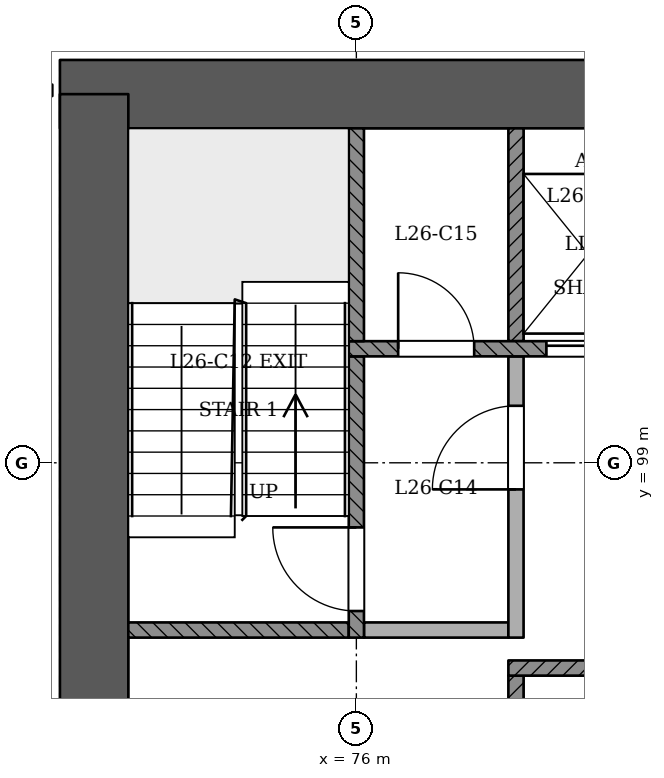
"""IFC4 building model, lengths in metres.
Left out: names, types, materials, properties, quantities, classifications, styles, units other than length and angle.
Written with IfcOpenShell. Run it as: python <this file> out.ifc"""

import sys

from ifc_helpers import new_model, si_unit, direction, frame, frame_2d, origin, place, context, subcontext, project, spatial, rectangle, extrude, element, fill, save


model = new_model("IFC4")
c1 = context("Model", 3, precision=1e-05, world=origin(), true_north=direction((0.0, 1.0)))
c2 = subcontext(c1, "Body", "Model", "MODEL_VIEW")
j1 = project(units=[si_unit("LENGTHUNIT", "METRE"), si_unit("PLANEANGLEUNIT", "RADIAN")], contexts=[c1])
p1 = place(None, origin())
s1 = spatial("IfcSite", under=j1, at=p1, CompositionType="ELEMENT")
p2 = place(p1, origin())
s2 = spatial("IfcBuilding", under=s1, at=p2, CompositionType="ELEMENT")
p3 = place(p2, frame((0.0, 0.0, 104.4)))
s3 = spatial("IfcBuildingStorey", under=s2, at=p3, CompositionType="ELEMENT", Elevation=104.4)
p4 = place(p3, frame((97.45, 103.85, 0.0), z_axis=(0.0, 0.0, 1.0), x_axis=(-1.0, 0.0, 0.0)))
e1 = element("IfcWall", 1, at=p4, inside=s3, PredefinedType="SHEAR", context=c2, shape_type="SweptSolid", body=[
    extrude(rectangle(XDim=25.35, YDim=0.9, at=frame_2d((12.675, 0.0))), origin(), (0.0, 0.0, 1.0), 3.6),
])
p5 = place(p3, frame((72.55, 103.85, 0.0), z_axis=(0.0, 0.0, 1.0), x_axis=(0.0, -1.0, 0.0)))
e2 = element("IfcWall", 2, at=p5, inside=s3, PredefinedType="SHEAR", context=c2, shape_type="SweptSolid", body=[
    extrude(rectangle(XDim=11.35, YDim=0.9, at=frame_2d((5.675, 0.0))), origin(), (0.0, 0.0, 1.0), 3.6),
])
p6 = place(p3, frame((63.745, 97.773, 0.0), z_axis=(0.0, 0.0, 1.0), x_axis=(0.500001045382, -0.866024800232, 0.0)))
e3 = element("IfcWall", 3, at=p6, inside=s3, PredefinedType="PARTITIONING", context=c2, shape_type="SweptSolid", body=[
    extrude(rectangle(XDim=41.671, YDim=0.15, at=frame_2d((20.836, 0.0))), origin(), (0.0, 0.0, 1.0), 2.7),
])
p7 = place(p6, frame((2.868, 0.0, 0.0)))
e4 = element("IfcOpeningElement", 4, at=p7, cuts=e3, PredefinedType="OPENING", context=c2, shape_type="SweptSolid", body=[
    extrude(rectangle(XDim=1.2, YDim=2.1, at=frame_2d((0.6, 1.05))), frame((0.0, 0.085, 0.0), z_axis=(0.0, -1.0, 0.0), x_axis=(1.0, 0.0, 0.0)), (0.0, 0.0, 1.0), 0.171),
])
p8 = place(p6, frame((10.115, 0.0, 0.0)))
e5 = element("IfcOpeningElement", 5, at=p8, cuts=e3, PredefinedType="OPENING", context=c2, shape_type="SweptSolid", body=[
    extrude(rectangle(XDim=1.0, YDim=2.1, at=frame_2d((0.5, 1.05))), frame((0.0, 0.085, 0.0), z_axis=(0.0, -1.0, 0.0), x_axis=(1.0, 0.0, 0.0)), (0.0, 0.0, 1.0), 0.171),
])
p9 = place(p6, frame((12.44, 0.0, 0.0)))
e6 = element("IfcOpeningElement", 6, at=p9, cuts=e3, PredefinedType="OPENING", context=c2, shape_type="SweptSolid", body=[
    extrude(rectangle(XDim=1.0, YDim=2.1, at=frame_2d((0.5, 1.05))), frame((0.0, 0.085, 0.0), z_axis=(0.0, -1.0, 0.0), x_axis=(1.0, 0.0, 0.0)), (0.0, 0.0, 1.0), 0.171),
])
p10 = place(p6, frame((19.231, 0.0, 0.0)))
e7 = element("IfcOpeningElement", 7, at=p10, cuts=e3, PredefinedType="OPENING", context=c2, shape_type="SweptSolid", body=[
    extrude(rectangle(XDim=1.0, YDim=2.1, at=frame_2d((0.5, 1.05))), frame((0.0, 0.085, 0.0), z_axis=(0.0, -1.0, 0.0), x_axis=(1.0, 0.0, 0.0)), (0.0, 0.0, 1.0), 0.171),
])
p11 = place(p6, frame((21.556, 0.0, 0.0)))
e8 = element("IfcOpeningElement", 8, at=p11, cuts=e3, PredefinedType="OPENING", context=c2, shape_type="SweptSolid", body=[
    extrude(rectangle(XDim=1.0, YDim=2.1, at=frame_2d((0.5, 1.05))), frame((0.0, 0.085, 0.0), z_axis=(0.0, -1.0, 0.0), x_axis=(1.0, 0.0, 0.0)), (0.0, 0.0, 1.0), 0.171),
])
p12 = place(p6, frame((27.086, 0.0, 0.0)))
e9 = element("IfcOpeningElement", 9, at=p12, cuts=e3, PredefinedType="OPENING", context=c2, shape_type="SweptSolid", body=[
    extrude(rectangle(XDim=1.0, YDim=2.1, at=frame_2d((0.5, 1.05))), frame((0.0, 0.085, 0.0), z_axis=(0.0, -1.0, 0.0), x_axis=(1.0, 0.0, 0.0)), (0.0, 0.0, 1.0), 0.171),
])
p13 = place(p6, frame((30.44, 0.0, 0.0)))
e10 = element("IfcOpeningElement", 10, at=p13, cuts=e3, PredefinedType="OPENING", context=c2, shape_type="SweptSolid", body=[
    extrude(rectangle(XDim=1.0, YDim=2.1, at=frame_2d((0.5, 1.05))), frame((0.0, 0.085, 0.0), z_axis=(0.0, -1.0, 0.0), x_axis=(1.0, 0.0, 0.0)), (0.0, 0.0, 1.0), 0.171),
])
p14 = place(p6, frame((37.619, 0.0, 0.0)))
e11 = element("IfcOpeningElement", 11, at=p14, cuts=e3, PredefinedType="OPENING", context=c2, shape_type="SweptSolid", body=[
    extrude(rectangle(XDim=1.2, YDim=2.1, at=frame_2d((0.6, 1.05))), frame((0.0, 0.085, 0.0), z_axis=(0.0, -1.0, 0.0), x_axis=(1.0, 0.0, 0.0)), (0.0, 0.0, 1.0), 0.171),
])
p15 = place(p3, frame((72.0, 103.9, 0.0), z_axis=(0.0, 0.0, 1.0), x_axis=(-1.0, 0.0, 0.0)))
e12 = element("IfcWall", 12, at=p15, inside=s3, PredefinedType="PARTITIONING", context=c2, shape_type="SweptSolid", body=[
    extrude(rectangle(XDim=1.493, YDim=0.15, at=frame_2d((0.747, 0.0))), origin(), (0.0, 0.0, 1.0), 3.1),
])
p16 = place(p3, frame((78.1, 93.4, 0.0), z_axis=(0.0, 0.0, 1.0), x_axis=(0.0, 1.0, 0.0)))
e13 = element("IfcWall", 13, at=p16, inside=s3, PredefinedType="SOLIDWALL", context=c2, shape_type="SweptSolid", body=[
    extrude(rectangle(XDim=2.8, YDim=0.2, at=frame_2d((1.4, 0.0))), origin(), (0.0, 0.0, 1.0), 3.1),
])
p17 = place(p3, frame((78.0, 96.3, 0.0), z_axis=(0.0, 0.0, 1.0), x_axis=(1.0, 0.0, 0.0)))
e14 = element("IfcWall", 14, at=p17, inside=s3, PredefinedType="SOLIDWALL", context=c2, shape_type="SweptSolid", body=[
    extrude(rectangle(XDim=7.8, YDim=0.2, at=frame_2d((3.9, 0.0))), origin(), (0.0, 0.0, 1.0), 3.1),
])
p18 = place(p3, frame((73.0, 96.8, 0.0), z_axis=(0.0, 0.0, 1.0), x_axis=(1.0, 0.0, 0.0)))
e15 = element("IfcWall", 15, at=p18, inside=s3, PredefinedType="SOLIDWALL", context=c2, shape_type="SweptSolid", body=[
    extrude(rectangle(XDim=2.9, YDim=0.2, at=frame_2d((1.45, 0.0))), origin(), (0.0, 0.0, 1.0), 3.1),
])
p19 = place(p3, frame((76.0, 96.7, 0.0), z_axis=(0.0, 0.0, 1.0), x_axis=(0.0, 1.0, 0.0)))
e16 = element("IfcWall", 16, at=p19, inside=s3, PredefinedType="SOLIDWALL", context=c2, shape_type="SweptSolid", body=[
    extrude(rectangle(XDim=3.7, YDim=0.2, at=frame_2d((1.85, 0.0))), origin(), (0.0, 0.0, 1.0), 3.1),
])
p20 = place(p19, frame((0.35, 0.0, 0.0)))
e17 = element("IfcOpeningElement", 17, at=p20, cuts=e16, PredefinedType="OPENING", context=c2, shape_type="SweptSolid", body=[
    extrude(rectangle(XDim=1.1, YDim=2.1, at=frame_2d((0.55, 1.05))), frame((0.0, 0.11, 0.0), z_axis=(0.0, -1.0, 0.0), x_axis=(1.0, 0.0, 0.0)), (0.0, 0.0, 1.0), 0.221),
])
p21 = place(p3, frame((76.1, 96.8, 0.0), z_axis=(0.0, 0.0, 1.0), x_axis=(1.0, 0.0, 0.0)))
e18 = element("IfcWall", 18, at=p21, inside=s3, PredefinedType="PARTITIONING", context=c2, shape_type="SweptSolid", body=[
    extrude(rectangle(XDim=1.9, YDim=0.2, at=frame_2d((0.95, 0.0))), origin(), (0.0, 0.0, 1.0), 3.1),
])
p22 = place(p3, frame((78.1, 96.7, 0.0), z_axis=(0.0, 0.0, 1.0), x_axis=(0.0, 1.0, 0.0)))
e19 = element("IfcWall", 19, at=p22, inside=s3, PredefinedType="PARTITIONING", context=c2, shape_type="SweptSolid", body=[
    extrude(rectangle(XDim=3.7, YDim=0.2, at=frame_2d((1.85, 0.0))), origin(), (0.0, 0.0, 1.0), 3.1),
])
p23 = place(p22, frame((1.95, 0.0, 0.0)))
e20 = element("IfcOpeningElement", 20, at=p23, cuts=e19, PredefinedType="OPENING", context=c2, shape_type="SweptSolid", body=[
    extrude(rectangle(XDim=1.1, YDim=2.1, at=frame_2d((0.55, 1.05))), frame((0.0, 0.11, 0.0), z_axis=(0.0, -1.0, 0.0), x_axis=(1.0, 0.0, 0.0)), (0.0, 0.0, 1.0), 0.221),
])
p24 = place(p3, frame((75.9, 100.5, 0.0), z_axis=(0.0, 0.0, 1.0), x_axis=(1.0, 0.0, 0.0)))
e21 = element("IfcWall", 21, at=p24, inside=s3, PredefinedType="SOLIDWALL", context=c2, shape_type="SweptSolid", body=[
    extrude(rectangle(XDim=18.2, YDim=0.2, at=frame_2d((9.1, 0.0))), origin(), (0.0, 0.0, 1.0), 3.1),
])
p25 = place(p24, frame((2.6, 0.0, 0.0)))
e22 = element("IfcOpeningElement", 22, at=p25, cuts=e21, PredefinedType="OPENING", context=c2, shape_type="SweptSolid", body=[
    extrude(rectangle(XDim=1.1, YDim=2.1, at=frame_2d((0.55, 1.05))), frame((0.0, 0.11, 0.0), z_axis=(0.0, -1.0, 0.0), x_axis=(1.0, 0.0, 0.0)), (0.0, 0.0, 1.0), 0.221),
])
p26 = place(p24, frame((4.5, 0.0, 0.0)))
e23 = element("IfcOpeningElement", 23, at=p26, cuts=e21, PredefinedType="OPENING", context=c2, shape_type="SweptSolid", body=[
    extrude(rectangle(XDim=1.1, YDim=2.1, at=frame_2d((0.55, 1.05))), frame((0.0, 0.11, 0.0), z_axis=(0.0, -1.0, 0.0), x_axis=(1.0, 0.0, 0.0)), (0.0, 0.0, 1.0), 0.221),
])
p27 = place(p24, frame((6.4, 0.0, 0.0)))
e24 = element("IfcOpeningElement", 24, at=p27, cuts=e21, PredefinedType="OPENING", context=c2, shape_type="SweptSolid", body=[
    extrude(rectangle(XDim=1.1, YDim=2.1, at=frame_2d((0.55, 1.05))), frame((0.0, 0.11, 0.0), z_axis=(0.0, -1.0, 0.0), x_axis=(1.0, 0.0, 0.0)), (0.0, 0.0, 1.0), 0.221),
])
p28 = place(p24, frame((8.3, 0.0, 0.0)))
e25 = element("IfcOpeningElement", 25, at=p28, cuts=e21, PredefinedType="OPENING", context=c2, shape_type="SweptSolid", body=[
    extrude(rectangle(XDim=1.1, YDim=2.1, at=frame_2d((0.55, 1.05))), frame((0.0, 0.11, 0.0), z_axis=(0.0, -1.0, 0.0), x_axis=(1.0, 0.0, 0.0)), (0.0, 0.0, 1.0), 0.221),
])
p29 = place(p24, frame((10.2, 0.0, 0.0)))
e26 = element("IfcOpeningElement", 26, at=p29, cuts=e21, PredefinedType="OPENING", context=c2, shape_type="SweptSolid", body=[
    extrude(rectangle(XDim=1.1, YDim=2.1, at=frame_2d((0.55, 1.05))), frame((0.0, 0.11, 0.0), z_axis=(0.0, -1.0, 0.0), x_axis=(1.0, 0.0, 0.0)), (0.0, 0.0, 1.0), 0.221),
])
p30 = place(p24, frame((12.1, 0.0, 0.0)))
e27 = element("IfcOpeningElement", 27, at=p30, cuts=e21, PredefinedType="OPENING", context=c2, shape_type="SweptSolid", body=[
    extrude(rectangle(XDim=1.1, YDim=2.1, at=frame_2d((0.55, 1.05))), frame((0.0, 0.11, 0.0), z_axis=(0.0, -1.0, 0.0), x_axis=(1.0, 0.0, 0.0)), (0.0, 0.0, 1.0), 0.221),
])
p31 = place(p24, frame((14.0, 0.0, 0.0)))
e28 = element("IfcOpeningElement", 28, at=p31, cuts=e21, PredefinedType="OPENING", context=c2, shape_type="SweptSolid", body=[
    extrude(rectangle(XDim=1.1, YDim=2.1, at=frame_2d((0.55, 1.05))), frame((0.0, 0.11, 0.0), z_axis=(0.0, -1.0, 0.0), x_axis=(1.0, 0.0, 0.0)), (0.0, 0.0, 1.0), 0.221),
])
p32 = place(p24, frame((0.65, 0.0, 0.0)))
e29 = element("IfcOpeningElement", 29, at=p32, cuts=e21, PredefinedType="OPENING", context=c2, shape_type="SweptSolid", body=[
    extrude(rectangle(XDim=1.0, YDim=2.1, at=frame_2d((0.5, 1.05))), frame((0.0, 0.11, 0.0), z_axis=(0.0, -1.0, 0.0), x_axis=(1.0, 0.0, 0.0)), (0.0, 0.0, 1.0), 0.221),
])
p33 = place(p24, frame((16.3, 0.0, 0.0)))
e30 = element("IfcOpeningElement", 30, at=p33, cuts=e21, PredefinedType="OPENING", context=c2, shape_type="SweptSolid", body=[
    extrude(rectangle(XDim=1.0, YDim=2.1, at=frame_2d((0.5, 1.05))), frame((0.0, 0.11, 0.0), z_axis=(0.0, -1.0, 0.0), x_axis=(1.0, 0.0, 0.0)), (0.0, 0.0, 1.0), 0.221),
])
for number, where, z_axis, x_axis in (
    (31, (76.0, 100.6, 0.0), (0.0, 0.0, 1.0), (0.0, 1.0, 0.0)),
    (32, (78.1, 100.6, 0.0), (0.0, 0.0, 1.0), (0.0, 1.0, 0.0)),
):
    element("IfcWall", number, at=place(p3, frame(where, z_axis=z_axis, x_axis=x_axis)), inside=s3, PredefinedType="SOLIDWALL", context=c2, shape_type="SweptSolid", body=[
        extrude(rectangle(XDim=2.8, YDim=0.2, at=frame_2d((1.4, 0.0))), origin(), (0.0, 0.0, 1.0), 3.1),
    ])
p34 = place(p25, origin())
e33 = element("IfcDoor", 33, at=p34, inside=s3, OperationType="SLIDING_TO_RIGHT", PredefinedType="NOTDEFINED", context=c2, shape_type="SweptSolid", body=[
    extrude(rectangle(XDim=1.1, YDim=2.1, at=frame_2d((0.55, 1.05))), frame((0.0, 0.025, 0.0), z_axis=(0.0, -1.0, 0.0), x_axis=(1.0, 0.0, 0.0)), (0.0, 0.0, 1.0), 0.05),
])
fill(e22, e33)
p35 = place(p20, origin())
e34 = element("IfcDoor", 34, at=p35, inside=s3, OperationType="SINGLE_SWING_RIGHT", PredefinedType="NOTDEFINED", context=c2, shape_type="SweptSolid", body=[
    extrude(rectangle(XDim=1.1, YDim=2.1, at=frame_2d((0.55, 1.05))), frame((0.0, 0.025, 0.0), z_axis=(0.0, -1.0, 0.0), x_axis=(1.0, 0.0, 0.0)), (0.0, 0.0, 1.0), 0.05),
])
fill(e17, e34)
p36 = place(p23, origin())
e35 = element("IfcDoor", 35, at=p36, inside=s3, OperationType="SINGLE_SWING_LEFT", PredefinedType="NOTDEFINED", context=c2, shape_type="SweptSolid", body=[
    extrude(rectangle(XDim=1.1, YDim=2.1, at=frame_2d((0.55, 1.05))), frame((0.0, 0.025, 0.0), z_axis=(0.0, -1.0, 0.0), x_axis=(1.0, 0.0, 0.0)), (0.0, 0.0, 1.0), 0.05),
])
fill(e20, e35)
p37 = place(p32, origin())
e36 = element("IfcDoor", 36, at=p37, inside=s3, OperationType="SINGLE_SWING_LEFT", PredefinedType="NOTDEFINED", context=c2, shape_type="SweptSolid", body=[
    extrude(rectangle(XDim=1.0, YDim=2.1, at=frame_2d((0.5, 1.05))), frame((0.0, 0.025, 0.0), z_axis=(0.0, -1.0, 0.0), x_axis=(1.0, 0.0, 0.0)), (0.0, 0.0, 1.0), 0.05),
])
fill(e29, e36)
save(model, sys.argv[1])
